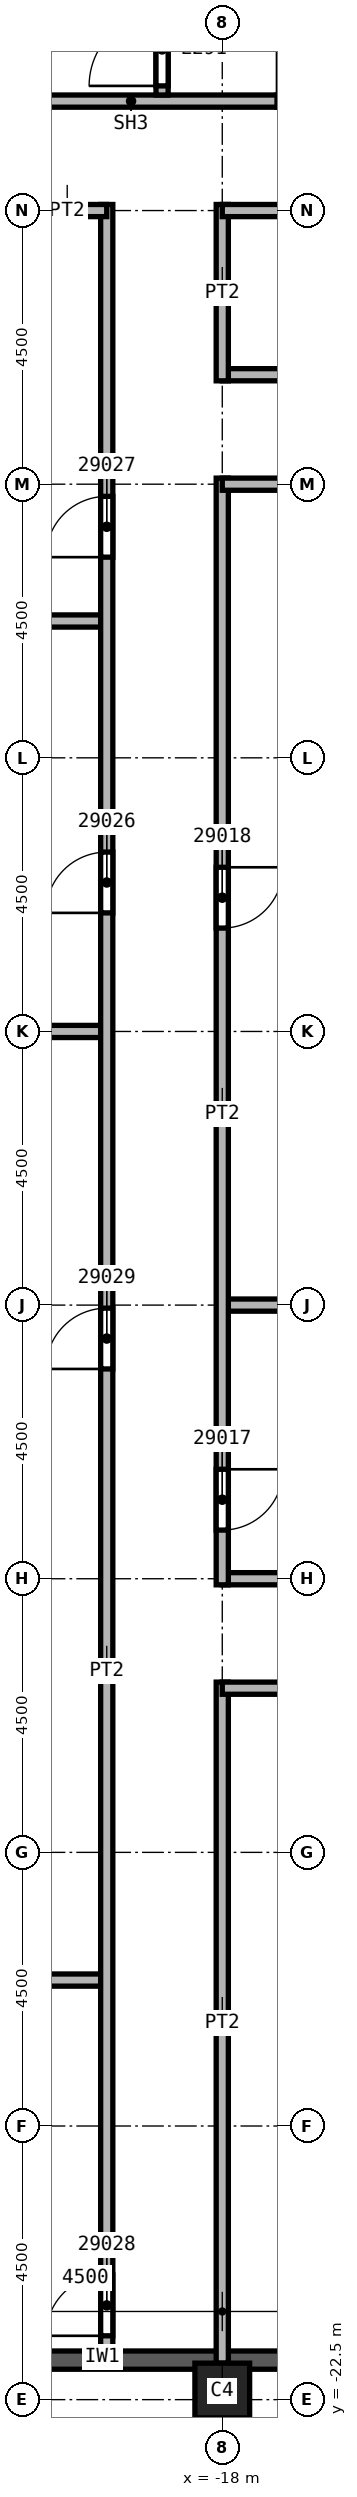
"""IFC4 building model, lengths in metres.
Left out: names, types, materials, properties, quantities, classifications, styles, units other than length and angle.
Written with IfcOpenShell. Run it as: python <this file> out.ifc"""

import sys

from ifc_helpers import new_model, si_unit, direction, frame, frame_2d, origin, origin_2d, place, context, subcontext, project, spatial, rectangle, extrude, element, fill, save


model = new_model("IFC4")
c1 = context("Model", 3, precision=1e-05, world=origin(), true_north=direction((0.0, 1.0)))
c2 = subcontext(c1, "Body", "Model", "MODEL_VIEW")
j1 = project(units=[si_unit("LENGTHUNIT", "METRE"), si_unit("PLANEANGLEUNIT", "RADIAN")], contexts=[c1])
p1 = place(None, origin())
s1 = spatial("IfcSite", under=j1, at=p1, CompositionType="ELEMENT")
p2 = place(p1, origin())
s2 = spatial("IfcBuilding", under=s1, at=p2, CompositionType="ELEMENT")
p3 = place(p2, frame((0.0, 0.0, 294.0)))
s3 = spatial("IfcBuildingStorey", under=s2, at=p3, CompositionType="ELEMENT", Elevation=294.0)
p4 = place(p3, frame((-18.0, -22.35, 0.0), z_axis=(0.0, -0.179908897505, 0.983683276567), x_axis=(1.0, 0.0, 0.0)))
e1 = element("IfcColumn", 1, at=p4, inside=s3, PredefinedType="COLUMN", context=c2, shape_type="SweptSolid", body=[
    extrude(rectangle(XDim=0.9, YDim=0.9, at=origin_2d()), origin(), (0.0, 0.0, 1.0), 5.835),
])
for number, where, z_axis, x_axis in (
    (2, (-22.05, -21.85, 0.0), (0.0, 0.0, 1.0), (1.0, 0.0, 0.0)),
    (3, (-17.95, -21.85, 0.0), (0.0, 0.0, 1.0), (1.0, 0.0, 0.0)),
):
    element("IfcWall", number, at=place(p3, frame(where, z_axis=z_axis, x_axis=x_axis)), inside=s3, PredefinedType="SOLIDWALL", context=c2, shape_type="SweptSolid", body=[
        extrude(rectangle(XDim=4.0, YDim=0.3, at=frame_2d((2.0, 0.0))), origin(), (0.0, 0.0, 1.0), 5.14),
    ])
p5 = place(p3, frame((-24.5, -15.6, 0.0), z_axis=(0.0, 0.0, 1.0), x_axis=(1.0, 0.0, 0.0)))
e4 = element("IfcWall", 4, at=p5, inside=s3, PredefinedType="PARTITIONING", context=c2, shape_type="SweptSolid", body=[
    extrude(rectangle(XDim=4.6, YDim=0.2, at=frame_2d((2.3, 0.0))), origin(), (0.0, 0.0, 1.0), 5.74),
])
p6 = place(p3, frame((-19.9, 0.0, 0.0), z_axis=(0.0, 0.0, 1.0), x_axis=(-1.0, 0.0, 0.0)))
e5 = element("IfcWall", 5, at=p6, inside=s3, PredefinedType="PARTITIONING", context=c2, shape_type="SweptSolid", body=[
    extrude(rectangle(XDim=6.65, YDim=0.2, at=frame_2d((3.325, 0.0))), origin(), (0.0, 0.0, 1.0), 5.74),
])
p7 = place(p3, frame((-23.45, 6.75, 0.0), z_axis=(0.0, 0.0, 1.0), x_axis=(1.0, 0.0, 0.0)))
e6 = element("IfcWall", 6, at=p7, inside=s3, PredefinedType="PARTITIONING", context=c2, shape_type="SweptSolid", body=[
    extrude(rectangle(XDim=3.55, YDim=0.2, at=frame_2d((1.775, 0.0))), origin(), (0.0, 0.0, 1.0), 5.74),
])
p8 = place(p3, frame((-19.9, -21.7, 0.0), z_axis=(0.0, 0.0, 1.0), x_axis=(0.0, 1.0, 0.0)))
e7 = element("IfcWall", 7, at=p8, inside=s3, PredefinedType="PARTITIONING", context=c2, shape_type="SweptSolid", body=[
    extrude(rectangle(XDim=35.3, YDim=0.2, at=frame_2d((17.65, 0.0))), origin(), (0.0, 0.0, 1.0), 5.74),
])
p9 = place(p8, frame((23.65, 0.0, 0.0)))
e8 = element("IfcOpeningElement", 8, at=p9, cuts=e7, PredefinedType="OPENING", context=c2, shape_type="SweptSolid", body=[
    extrude(rectangle(XDim=1.0, YDim=2.1, at=frame_2d((0.5, 1.05))), frame((0.0, 0.1, 0.0), z_axis=(0.0, -1.0, 0.0), x_axis=(1.0, 0.0, 0.0)), (0.0, 0.0, 1.0), 0.2),
])
p10 = place(p8, frame((29.5, 0.0, 0.0)))
e9 = element("IfcOpeningElement", 9, at=p10, cuts=e7, PredefinedType="OPENING", context=c2, shape_type="SweptSolid", body=[
    extrude(rectangle(XDim=1.0, YDim=2.1, at=frame_2d((0.5, 1.05))), frame((0.0, 0.1, 0.0), z_axis=(0.0, -1.0, 0.0), x_axis=(1.0, 0.0, 0.0)), (0.0, 0.0, 1.0), 0.2),
])
p11 = place(p8, frame((0.25, 0.0, 0.0)))
e10 = element("IfcOpeningElement", 10, at=p11, cuts=e7, PredefinedType="OPENING", context=c2, shape_type="SweptSolid", body=[
    extrude(rectangle(XDim=1.0, YDim=2.1, at=frame_2d((0.5, 1.05))), frame((0.0, 0.1, 0.0), z_axis=(0.0, -1.0, 0.0), x_axis=(1.0, 0.0, 0.0)), (0.0, 0.0, 1.0), 0.2),
])
p12 = place(p8, frame((16.15, 0.0, 0.0)))
e11 = element("IfcOpeningElement", 11, at=p12, cuts=e7, PredefinedType="OPENING", context=c2, shape_type="SweptSolid", body=[
    extrude(rectangle(XDim=1.0, YDim=2.1, at=frame_2d((0.5, 1.05))), frame((0.0, 0.1, 0.0), z_axis=(0.0, -1.0, 0.0), x_axis=(1.0, 0.0, 0.0)), (0.0, 0.0, 1.0), 0.2),
])
p13 = place(p3, frame((-19.9, 13.5, 0.0), z_axis=(0.0, 0.0, 1.0), x_axis=(-1.0, 0.0, 0.0)))
e12 = element("IfcWall", 12, at=p13, inside=s3, PredefinedType="PARTITIONING", context=c2, shape_type="SweptSolid", body=[
    extrude(rectangle(XDim=1.2, YDim=0.2, at=frame_2d((0.6, 0.0))), origin(), (0.0, 0.0, 1.0), 5.74),
])
p14 = place(p3, frame((-18.0, -10.7, 0.0), z_axis=(0.0, 0.0, 1.0), x_axis=(0.0, -1.0, 0.0)))
e13 = element("IfcWall", 13, at=p14, inside=s3, PredefinedType="PARTITIONING", context=c2, shape_type="SweptSolid", body=[
    extrude(rectangle(XDim=11.2, YDim=0.2, at=frame_2d((5.6, 0.0))), origin(), (0.0, 0.0, 1.0), 5.74),
])
for number, where, z_axis, x_axis in (
    (14, (-18.0, -9.0, 0.0), (0.0, 0.0, 1.0), (1.0, 0.0, 0.0)),
    (15, (-18.0, -4.5, 0.0), (0.0, 0.0, 1.0), (1.0, 0.0, 0.0)),
):
    element("IfcWall", number, at=place(p3, frame(where, z_axis=z_axis, x_axis=x_axis)), inside=s3, PredefinedType="PARTITIONING", context=c2, shape_type="SweptSolid", body=[
        extrude(rectangle(XDim=4.5, YDim=0.2, at=frame_2d((2.25, 0.0))), origin(), (0.0, 0.0, 1.0), 5.74),
    ])
p15 = place(p3, frame((-18.0, 9.1, 0.0), z_axis=(0.0, 0.0, 1.0), x_axis=(0.0, -1.0, 0.0)))
e16 = element("IfcWall", 16, at=p15, inside=s3, PredefinedType="PARTITIONING", context=c2, shape_type="SweptSolid", body=[
    extrude(rectangle(XDim=18.2, YDim=0.2, at=frame_2d((9.1, 0.0))), origin(), (0.0, 0.0, 1.0), 5.74),
])
p16 = place(p15, frame((16.3, 0.0, 0.0)))
e17 = element("IfcOpeningElement", 17, at=p16, cuts=e16, PredefinedType="OPENING", context=c2, shape_type="SweptSolid", body=[
    extrude(rectangle(XDim=1.0, YDim=2.1, at=frame_2d((0.5, 1.05))), frame((0.0, 0.1, 0.0), z_axis=(0.0, -1.0, 0.0), x_axis=(1.0, 0.0, 0.0)), (0.0, 0.0, 1.0), 0.2),
])
p17 = place(p15, frame((6.4, 0.0, 0.0)))
e18 = element("IfcOpeningElement", 18, at=p17, cuts=e16, PredefinedType="OPENING", context=c2, shape_type="SweptSolid", body=[
    extrude(rectangle(XDim=1.0, YDim=2.1, at=frame_2d((0.5, 1.05))), frame((0.0, 0.1, 0.0), z_axis=(0.0, -1.0, 0.0), x_axis=(1.0, 0.0, 0.0)), (0.0, 0.0, 1.0), 0.2),
])
p18 = place(p3, frame((-18.0, 10.8, 0.0), z_axis=(0.0, 0.0, 1.0), x_axis=(1.0, 0.0, 0.0)))
e19 = element("IfcWall", 19, at=p18, inside=s3, PredefinedType="PARTITIONING", context=c2, shape_type="SweptSolid", body=[
    extrude(rectangle(XDim=3.6, YDim=0.2, at=frame_2d((1.8, 0.0))), origin(), (0.0, 0.0, 1.0), 5.74),
])
p19 = place(p3, frame((-18.0, 13.6, 0.0), z_axis=(0.0, 0.0, 1.0), x_axis=(0.0, -1.0, 0.0)))
e20 = element("IfcWall", 20, at=p19, inside=s3, PredefinedType="PARTITIONING", context=c2, shape_type="SweptSolid", body=[
    extrude(rectangle(XDim=2.9, YDim=0.2, at=frame_2d((1.45, 0.0))), origin(), (0.0, 0.0, 1.0), 5.74),
])
p20 = place(p3, frame((-15.3, 13.5, 0.0), z_axis=(0.0, 0.0, 1.0), x_axis=(-1.0, 0.0, 0.0)))
e21 = element("IfcWall", 21, at=p20, inside=s3, PredefinedType="PARTITIONING", context=c2, shape_type="SweptSolid", body=[
    extrude(rectangle(XDim=2.7, YDim=0.2, at=frame_2d((1.35, 0.0))), origin(), (0.0, 0.0, 1.0), 5.74),
])
p21 = place(p3, frame((-14.4, -10.8, 0.0), z_axis=(0.0, 0.0, 1.0), x_axis=(-1.0, 0.0, 0.0)))
e22 = element("IfcWall", 22, at=p21, inside=s3, PredefinedType="PARTITIONING", context=c2, shape_type="SweptSolid", body=[
    extrude(rectangle(XDim=3.6, YDim=0.2, at=frame_2d((1.8, 0.0))), origin(), (0.0, 0.0, 1.0), 5.74),
])
p22 = place(p3, frame((-13.5, 9.0, 0.0), z_axis=(0.0, 0.0, 1.0), x_axis=(-1.0, 0.0, 0.0)))
e23 = element("IfcWall", 23, at=p22, inside=s3, PredefinedType="PARTITIONING", context=c2, shape_type="SweptSolid", body=[
    extrude(rectangle(XDim=4.5, YDim=0.2, at=frame_2d((2.25, 0.0))), origin(), (0.0, 0.0, 1.0), 5.74),
])
p23 = place(p3, frame((-21.9, 15.3, 0.0), z_axis=(0.0, 0.0, 1.0), x_axis=(1.0, 0.0, 0.0)))
e24 = element("IfcWall", 24, at=p23, inside=s3, PredefinedType="SOLIDWALL", context=c2, shape_type="SweptSolid", body=[
    extrude(rectangle(XDim=8.275, YDim=0.2, at=frame_2d((4.137, 0.0))), origin(), (0.0, 0.0, 1.0), 5.74),
])
p24 = place(p23, frame((4.8, 0.0, 0.0)))
e25 = element("IfcOpeningElement", 25, at=p24, cuts=e24, PredefinedType="OPENING", context=c2, shape_type="SweptSolid", body=[
    extrude(rectangle(XDim=1.2, YDim=2.1, at=frame_2d((0.6, 1.05))), frame((0.0, 0.1, 0.0), z_axis=(0.0, -1.0, 0.0), x_axis=(1.0, 0.0, 0.0)), (0.0, 0.0, 1.0), 0.2),
])
p25 = place(p3, frame((-18.99, 15.4, 0.0), z_axis=(0.0, 0.0, 1.0), x_axis=(0.0, 1.0, 0.0)))
e26 = element("IfcWall", 26, at=p25, inside=s3, PredefinedType="SOLIDWALL", context=c2, shape_type="SweptSolid", body=[
    extrude(rectangle(XDim=5.9, YDim=0.2, at=frame_2d((2.95, 0.0))), origin(), (0.0, 0.0, 1.0), 5.74),
])
p26 = place(p25, frame((0.15, 0.0, 0.0)))
e27 = element("IfcOpeningElement", 27, at=p26, cuts=e26, PredefinedType="OPENING", context=c2, shape_type="SweptSolid", body=[
    extrude(rectangle(XDim=1.2, YDim=2.1, at=frame_2d((0.6, 1.05))), frame((0.0, 0.1, 0.0), z_axis=(0.0, -1.0, 0.0), x_axis=(1.0, 0.0, 0.0)), (0.0, 0.0, 1.0), 0.2),
])
p27 = place(p16, origin())
e28 = element("IfcDoor", 28, at=p27, inside=s3, OperationType="SINGLE_SWING_RIGHT", PredefinedType="DOOR", context=c2, shape_type="SweptSolid", body=[
    extrude(rectangle(XDim=1.0, YDim=2.1, at=frame_2d((0.5, 1.05))), frame((0.0, 0.025, 0.0), z_axis=(0.0, -1.0, 0.0), x_axis=(1.0, 0.0, 0.0)), (0.0, 0.0, 1.0), 0.05),
])
fill(e17, e28)
p28 = place(p17, origin())
e29 = element("IfcDoor", 29, at=p28, inside=s3, OperationType="SINGLE_SWING_LEFT", PredefinedType="DOOR", context=c2, shape_type="SweptSolid", body=[
    extrude(rectangle(XDim=1.0, YDim=2.1, at=frame_2d((0.5, 1.05))), frame((0.0, 0.025, 0.0), z_axis=(0.0, -1.0, 0.0), x_axis=(1.0, 0.0, 0.0)), (0.0, 0.0, 1.0), 0.05),
])
fill(e18, e29)
p29 = place(p9, origin())
e30 = element("IfcDoor", 30, at=p29, inside=s3, OperationType="SINGLE_SWING_LEFT", PredefinedType="DOOR", context=c2, shape_type="SweptSolid", body=[
    extrude(rectangle(XDim=1.0, YDim=2.1, at=frame_2d((0.5, 1.05))), frame((0.0, 0.025, 0.0), z_axis=(0.0, -1.0, 0.0), x_axis=(1.0, 0.0, 0.0)), (0.0, 0.0, 1.0), 0.05),
])
fill(e8, e30)
p30 = place(p10, origin())
e31 = element("IfcDoor", 31, at=p30, inside=s3, OperationType="SINGLE_SWING_RIGHT", PredefinedType="DOOR", context=c2, shape_type="SweptSolid", body=[
    extrude(rectangle(XDim=1.0, YDim=2.1, at=frame_2d((0.5, 1.05))), frame((0.0, 0.025, 0.0), z_axis=(0.0, -1.0, 0.0), x_axis=(1.0, 0.0, 0.0)), (0.0, 0.0, 1.0), 0.05),
])
fill(e9, e31)
p31 = place(p11, origin())
e32 = element("IfcDoor", 32, at=p31, inside=s3, OperationType="SINGLE_SWING_LEFT", PredefinedType="DOOR", context=c2, shape_type="SweptSolid", body=[
    extrude(rectangle(XDim=1.0, YDim=2.1, at=frame_2d((0.5, 1.05))), frame((0.0, 0.025, 0.0), z_axis=(0.0, -1.0, 0.0), x_axis=(1.0, 0.0, 0.0)), (0.0, 0.0, 1.0), 0.05),
])
fill(e10, e32)
p32 = place(p12, origin())
e33 = element("IfcDoor", 33, at=p32, inside=s3, OperationType="SINGLE_SWING_RIGHT", PredefinedType="DOOR", context=c2, shape_type="SweptSolid", body=[
    extrude(rectangle(XDim=1.0, YDim=2.1, at=frame_2d((0.5, 1.05))), frame((0.0, 0.025, 0.0), z_axis=(0.0, -1.0, 0.0), x_axis=(1.0, 0.0, 0.0)), (0.0, 0.0, 1.0), 0.05),
])
fill(e11, e33)
p33 = place(p26, origin())
e34 = element("IfcDoor", 34, at=p33, inside=s3, OperationType="SINGLE_SWING_LEFT", PredefinedType="DOOR", context=c2, shape_type="SweptSolid", body=[
    extrude(rectangle(XDim=1.2, YDim=2.1, at=frame_2d((0.6, 1.05))), frame((0.0, 0.025, 0.0), z_axis=(0.0, -1.0, 0.0), x_axis=(1.0, 0.0, 0.0)), (0.0, 0.0, 1.0), 0.05),
])
fill(e27, e34)
save(model, sys.argv[1])
